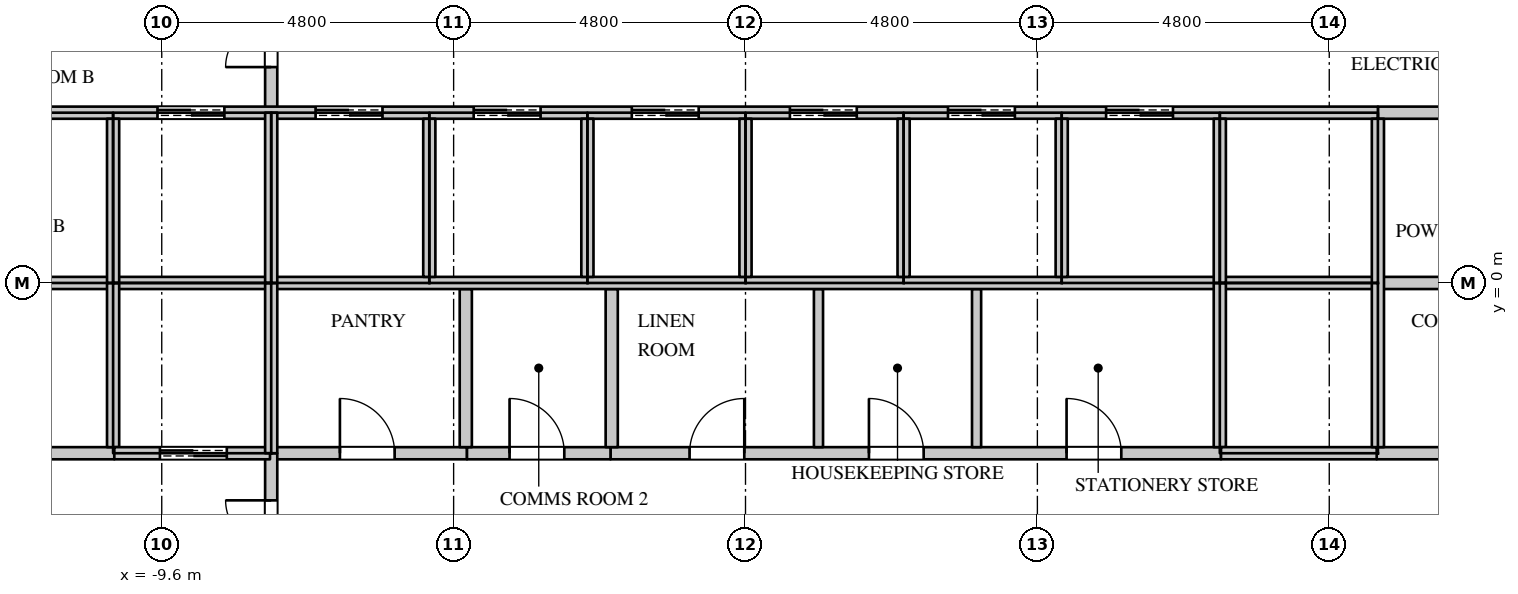
"""IFC4 building model, lengths in metres.
Left out: names, types, materials, properties, quantities, classifications, styles, units other than length and angle.
Written with IfcOpenShell. Run it as: python <this file> out.ifc"""

import sys

from ifc_helpers import new_model, si_unit, direction, frame, frame_2d, origin, place, context, subcontext, project, spatial, rectangle, extrude, element, fill, save


model = new_model("IFC4")
c1 = context("Model", 3, precision=1e-05, world=origin(), true_north=direction((0.0, 1.0)))
c2 = subcontext(c1, "Body", "Model", "MODEL_VIEW")
j1 = project(units=[si_unit("LENGTHUNIT", "METRE"), si_unit("PLANEANGLEUNIT", "RADIAN")], contexts=[c1])
p1 = place(None, origin())
s1 = spatial("IfcSite", under=j1, at=p1, CompositionType="ELEMENT")
p2 = place(p1, origin())
s2 = spatial("IfcBuilding", under=s1, at=p2, CompositionType="ELEMENT")
p3 = place(p2, frame((0.0, 0.0, 106.5)))
s3 = spatial("IfcBuildingStorey", under=s2, at=p3, CompositionType="ELEMENT", Elevation=106.5)
p4 = place(p3, frame((-7.82, -2.8, 0.0), z_axis=(0.0, 0.0, 1.0), x_axis=(1.0, 0.0, 0.0)))
e1 = element("IfcWall", 1, at=p4, inside=s3, PredefinedType="PARTITIONING", context=c2, shape_type="SweptSolid", body=[
    extrude(rectangle(XDim=3.24, YDim=0.2, at=frame_2d((1.62, 0.0))), origin(), (0.0, 0.0, 1.0), 3.95),
])
p5 = place(p4, frame((1.15, 0.0, 0.0)))
e2 = element("IfcOpeningElement", 2, at=p5, cuts=e1, PredefinedType="OPENING", context=c2, shape_type="SweptSolid", body=[
    extrude(rectangle(XDim=0.9, YDim=2.2, at=frame_2d((0.45, 1.1))), frame((0.0, 0.11, 0.0), z_axis=(0.0, -1.0, 0.0), x_axis=(1.0, 0.0, 0.0)), (0.0, 0.0, 1.0), 0.22),
])
p6 = place(p3, frame((-7.8, -8.075, 0.0), z_axis=(0.0, 0.0, 1.0), x_axis=(0.0, 1.0, 0.0)))
e3 = element("IfcWall", 3, at=p6, inside=s3, PredefinedType="PARTITIONING", context=c2, shape_type="SweptSolid", body=[
    extrude(rectangle(XDim=5.275, YDim=0.2, at=frame_2d((2.637, 0.0))), origin(), (0.0, 0.0, 1.0), 3.95),
])
p7 = place(p6, frame((3.0, 0.0, 0.0)))
e4 = element("IfcOpeningElement", 4, at=p7, cuts=e3, PredefinedType="OPENING", context=c2, shape_type="SweptSolid", body=[
    extrude(rectangle(XDim=1.5, YDim=2.4, at=frame_2d((0.75, 1.2))), frame((0.0, 0.11, 0.0), z_axis=(0.0, -1.0, 0.0), x_axis=(1.0, 0.0, 0.0)), (0.0, 0.0, 1.0), 0.22),
])
p8 = place(p3, frame((-7.8, 2.8, 0.0), z_axis=(0.0, 0.0, 1.0), x_axis=(0.0, 1.0, 0.0)))
e5 = element("IfcWall", 5, at=p8, inside=s3, PredefinedType="PARTITIONING", context=c2, shape_type="SweptSolid", body=[
    extrude(rectangle(XDim=5.275, YDim=0.2, at=frame_2d((2.637, 0.0))), origin(), (0.0, 0.0, 1.0), 3.95),
])
p9 = place(p8, frame((0.75, 0.0, 0.0)))
e6 = element("IfcOpeningElement", 6, at=p9, cuts=e5, PredefinedType="OPENING", context=c2, shape_type="SweptSolid", body=[
    extrude(rectangle(XDim=1.5, YDim=2.4, at=frame_2d((0.75, 1.2))), frame((0.0, 0.11, 0.0), z_axis=(0.0, -1.0, 0.0), x_axis=(1.0, 0.0, 0.0)), (0.0, 0.0, 1.0), 0.22),
])
p10 = place(p3, frame((-2.22, -2.8, 0.0), z_axis=(0.0, 0.0, 1.0), x_axis=(1.0, 0.0, 0.0)))
e7 = element("IfcWall", 7, at=p10, inside=s3, PredefinedType="PARTITIONING", context=c2, shape_type="SweptSolid", body=[
    extrude(rectangle(XDim=10.04, YDim=0.2, at=frame_2d((5.02, 0.0))), origin(), (0.0, 0.0, 1.0), 3.95),
])
p11 = place(p10, frame((1.3, 0.0, 0.0)))
e8 = element("IfcOpeningElement", 8, at=p11, cuts=e7, PredefinedType="OPENING", context=c2, shape_type="SweptSolid", body=[
    extrude(rectangle(XDim=0.9, YDim=2.2, at=frame_2d((0.45, 1.1))), frame((0.0, 0.11, 0.0), z_axis=(0.0, -1.0, 0.0), x_axis=(1.0, 0.0, 0.0)), (0.0, 0.0, 1.0), 0.22),
])
p12 = place(p10, frame((4.25, 0.0, 0.0)))
e9 = element("IfcOpeningElement", 9, at=p12, cuts=e7, PredefinedType="OPENING", context=c2, shape_type="SweptSolid", body=[
    extrude(rectangle(XDim=0.9, YDim=2.2, at=frame_2d((0.45, 1.1))), frame((0.0, 0.11, 0.0), z_axis=(0.0, -1.0, 0.0), x_axis=(1.0, 0.0, 0.0)), (0.0, 0.0, 1.0), 0.22),
])
p13 = place(p10, frame((7.5, 0.0, 0.0)))
e10 = element("IfcOpeningElement", 10, at=p13, cuts=e7, PredefinedType="OPENING", context=c2, shape_type="SweptSolid", body=[
    extrude(rectangle(XDim=0.9, YDim=2.2, at=frame_2d((0.45, 1.1))), frame((0.0, 0.11, 0.0), z_axis=(0.0, -1.0, 0.0), x_axis=(1.0, 0.0, 0.0)), (0.0, 0.0, 1.0), 0.22),
])
for number, where, z_axis, x_axis in (
    (11, (1.2, -2.7, 0.0), (0.0, 0.0, 1.0), (0.0, 1.0, 0.0)),
    (12, (3.8, -2.7, 0.0), (0.0, 0.0, 1.0), (0.0, 1.0, 0.0)),
):
    element("IfcWall", number, at=place(p3, frame(where, z_axis=z_axis, x_axis=x_axis)), inside=s3, PredefinedType="PARTITIONING", context=c2, shape_type="SweptSolid", body=[
        extrude(rectangle(XDim=2.6, YDim=0.15, at=frame_2d((1.3, 0.0))), origin(), (0.0, 0.0, 1.0), 3.95),
    ])
p14 = place(p3, frame((-13.57, -2.8, 0.0), z_axis=(0.0, 0.0, 1.0), x_axis=(1.0, 0.0, 0.0)))
e13 = element("IfcWall", 13, at=p14, inside=s3, PredefinedType="PARTITIONING", context=c2, shape_type="SweptSolid", body=[
    extrude(rectangle(XDim=3.19, YDim=0.2, at=frame_2d((1.595, 0.0))), origin(), (0.0, 0.0, 1.0), 3.95),
])
p15 = place(p14, frame((1.25, 0.0, 0.0)))
e14 = element("IfcOpeningElement", 14, at=p15, cuts=e13, PredefinedType="OPENING", context=c2, shape_type="SweptSolid", body=[
    extrude(rectangle(XDim=0.6, YDim=2.0, at=frame_2d((0.3, 1.0))), frame((0.0, 0.11, 0.0), z_axis=(0.0, -1.0, 0.0), x_axis=(1.0, 0.0, 0.0)), (0.0, 0.0, 1.0), 0.22),
])
p16 = place(p3, frame((-4.58, -2.8, 0.0), z_axis=(0.0, 0.0, 1.0), x_axis=(1.0, 0.0, 0.0)))
e15 = element("IfcWall", 15, at=p16, inside=s3, PredefinedType="PARTITIONING", context=c2, shape_type="SweptSolid", body=[
    extrude(rectangle(XDim=2.36, YDim=0.2, at=frame_2d((1.18, 0.0))), origin(), (0.0, 0.0, 1.0), 3.95),
])
p17 = place(p16, frame((0.7, 0.0, 0.0)))
e16 = element("IfcOpeningElement", 16, at=p17, cuts=e15, PredefinedType="OPENING", context=c2, shape_type="SweptSolid", body=[
    extrude(rectangle(XDim=0.9, YDim=2.2, at=frame_2d((0.45, 1.1))), frame((0.0, 0.11, 0.0), z_axis=(0.0, -1.0, 0.0), x_axis=(1.0, 0.0, 0.0)), (0.0, 0.0, 1.0), 0.22),
])
for number, where, z_axis, x_axis in (
    (17, (-4.6, -2.7, 0.0), (0.0, 0.0, 1.0), (0.0, 1.0, 0.0)),
    (18, (-2.2, -2.7, 0.0), (0.0, 0.0, 1.0), (0.0, 1.0, 0.0)),
):
    element("IfcWall", number, at=place(p3, frame(where, z_axis=z_axis, x_axis=x_axis)), inside=s3, PredefinedType="PARTITIONING", context=c2, shape_type="SweptSolid", body=[
        extrude(rectangle(XDim=2.6, YDim=0.2, at=frame_2d((1.3, 0.0))), origin(), (0.0, 0.0, 1.0), 3.95),
    ])
p18 = place(p3, frame((10.38, -2.8, 0.0), z_axis=(0.0, 0.0, 1.0), x_axis=(1.0, 0.0, 0.0)))
e19 = element("IfcWall", 19, at=p18, inside=s3, PredefinedType="PARTITIONING", context=c2, shape_type="SweptSolid", body=[
    extrude(rectangle(XDim=3.19, YDim=0.2, at=frame_2d((1.595, 0.0))), origin(), (0.0, 0.0, 1.0), 3.95),
])
p19 = place(p18, frame((1.1, 0.0, 0.0)))
e20 = element("IfcOpeningElement", 20, at=p19, cuts=e19, PredefinedType="OPENING", context=c2, shape_type="SweptSolid", body=[
    extrude(rectangle(XDim=0.9, YDim=2.2, at=frame_2d((0.45, 1.1))), frame((0.0, 0.11, 0.0), z_axis=(0.0, -1.0, 0.0), x_axis=(1.0, 0.0, 0.0)), (0.0, 0.0, 1.0), 0.22),
])
p20 = place(p3, frame((10.4, 2.8, 0.0), z_axis=(0.0, 0.0, 1.0), x_axis=(1.0, 0.0, 0.0)))
e21 = element("IfcWall", 21, at=p20, inside=s3, PredefinedType="PARTITIONING", context=c2, shape_type="SweptSolid", body=[
    extrude(rectangle(XDim=3.17, YDim=0.2, at=frame_2d((1.585, 0.0))), origin(), (0.0, 0.0, 1.0), 3.95),
])
p21 = place(p20, frame((1.25, 0.0, 0.0)))
e22 = element("IfcOpeningElement", 22, at=p21, cuts=e21, PredefinedType="OPENING", context=c2, shape_type="SweptSolid", body=[
    extrude(rectangle(XDim=0.6, YDim=2.0, at=frame_2d((0.3, 1.0))), frame((0.0, 0.11, 0.0), z_axis=(0.0, -1.0, 0.0), x_axis=(1.0, 0.0, 0.0)), (0.0, 0.0, 1.0), 0.22),
])
p22 = place(p3, frame((10.4, 0.0, 0.0), z_axis=(0.0, 0.0, 1.0), x_axis=(1.0, 0.0, 0.0)))
e23 = element("IfcWall", 23, at=p22, inside=s3, PredefinedType="PARTITIONING", context=c2, shape_type="SweptSolid", body=[
    extrude(rectangle(XDim=3.17, YDim=0.2, at=frame_2d((1.585, 0.0))), origin(), (0.0, 0.0, 1.0), 3.95),
])
p23 = place(p3, frame((-13.57, 0.0, 0.0), z_axis=(0.0, 0.0, 1.0), x_axis=(1.0, 0.0, 0.0)))
e24 = element("IfcWall", 24, at=p23, inside=s3, PredefinedType="PARTITIONING", context=c2, shape_type="SweptSolid", body=[
    extrude(rectangle(XDim=23.97, YDim=0.2, at=frame_2d((11.985, 0.0))), origin(), (0.0, 0.0, 1.0), 3.95),
])
p24 = place(p3, frame((-13.57, 2.8, 0.0), z_axis=(0.0, 0.0, 1.0), x_axis=(1.0, 0.0, 0.0)))
e25 = element("IfcWall", 25, at=p24, inside=s3, PredefinedType="PARTITIONING", context=c2, shape_type="SweptSolid", body=[
    extrude(rectangle(XDim=23.97, YDim=0.2, at=frame_2d((11.985, 0.0))), origin(), (0.0, 0.0, 1.0), 3.95),
])
p25 = place(p24, frame((1.0, 0.0, 0.0)))
e26 = element("IfcOpeningElement", 26, at=p25, cuts=e25, PredefinedType="OPENING", context=c2, shape_type="SweptSolid", body=[
    extrude(rectangle(XDim=1.1, YDim=2.2, at=frame_2d((0.55, 1.1))), frame((0.0, 0.11, 0.0), z_axis=(0.0, -1.0, 0.0), x_axis=(1.0, 0.0, 0.0)), (0.0, 0.0, 1.0), 0.22),
])
p26 = place(p24, frame((3.9, 0.0, 0.0)))
e27 = element("IfcOpeningElement", 27, at=p26, cuts=e25, PredefinedType="OPENING", context=c2, shape_type="SweptSolid", body=[
    extrude(rectangle(XDim=1.1, YDim=2.2, at=frame_2d((0.55, 1.1))), frame((0.0, 0.11, 0.0), z_axis=(0.0, -1.0, 0.0), x_axis=(1.0, 0.0, 0.0)), (0.0, 0.0, 1.0), 0.22),
])
p27 = place(p24, frame((6.5, 0.0, 0.0)))
e28 = element("IfcOpeningElement", 28, at=p27, cuts=e25, PredefinedType="OPENING", context=c2, shape_type="SweptSolid", body=[
    extrude(rectangle(XDim=1.1, YDim=2.2, at=frame_2d((0.55, 1.1))), frame((0.0, 0.11, 0.0), z_axis=(0.0, -1.0, 0.0), x_axis=(1.0, 0.0, 0.0)), (0.0, 0.0, 1.0), 0.22),
])
p28 = place(p24, frame((9.1, 0.0, 0.0)))
e29 = element("IfcOpeningElement", 29, at=p28, cuts=e25, PredefinedType="OPENING", context=c2, shape_type="SweptSolid", body=[
    extrude(rectangle(XDim=1.1, YDim=2.2, at=frame_2d((0.55, 1.1))), frame((0.0, 0.11, 0.0), z_axis=(0.0, -1.0, 0.0), x_axis=(1.0, 0.0, 0.0)), (0.0, 0.0, 1.0), 0.22),
])
p29 = place(p24, frame((11.7, 0.0, 0.0)))
e30 = element("IfcOpeningElement", 30, at=p29, cuts=e25, PredefinedType="OPENING", context=c2, shape_type="SweptSolid", body=[
    extrude(rectangle(XDim=1.1, YDim=2.2, at=frame_2d((0.55, 1.1))), frame((0.0, 0.11, 0.0), z_axis=(0.0, -1.0, 0.0), x_axis=(1.0, 0.0, 0.0)), (0.0, 0.0, 1.0), 0.22),
])
p30 = place(p24, frame((14.3, 0.0, 0.0)))
e31 = element("IfcOpeningElement", 31, at=p30, cuts=e25, PredefinedType="OPENING", context=c2, shape_type="SweptSolid", body=[
    extrude(rectangle(XDim=1.1, YDim=2.2, at=frame_2d((0.55, 1.1))), frame((0.0, 0.11, 0.0), z_axis=(0.0, -1.0, 0.0), x_axis=(1.0, 0.0, 0.0)), (0.0, 0.0, 1.0), 0.22),
])
p31 = place(p24, frame((16.9, 0.0, 0.0)))
e32 = element("IfcOpeningElement", 32, at=p31, cuts=e25, PredefinedType="OPENING", context=c2, shape_type="SweptSolid", body=[
    extrude(rectangle(XDim=1.1, YDim=2.2, at=frame_2d((0.55, 1.1))), frame((0.0, 0.11, 0.0), z_axis=(0.0, -1.0, 0.0), x_axis=(1.0, 0.0, 0.0)), (0.0, 0.0, 1.0), 0.22),
])
p32 = place(p24, frame((19.5, 0.0, 0.0)))
e33 = element("IfcOpeningElement", 33, at=p32, cuts=e25, PredefinedType="OPENING", context=c2, shape_type="SweptSolid", body=[
    extrude(rectangle(XDim=1.1, YDim=2.2, at=frame_2d((0.55, 1.1))), frame((0.0, 0.11, 0.0), z_axis=(0.0, -1.0, 0.0), x_axis=(1.0, 0.0, 0.0)), (0.0, 0.0, 1.0), 0.22),
])
p33 = place(p3, frame((-10.4, -2.7, 0.0), z_axis=(0.0, 0.0, 1.0), x_axis=(0.0, 1.0, 0.0)))
e34 = element("IfcWall", 34, at=p33, inside=s3, PredefinedType="PARTITIONING", context=c2, shape_type="SweptSolid", body=[
    extrude(rectangle(XDim=2.7, YDim=0.2, at=frame_2d((1.35, 0.0))), origin(), (0.0, 0.0, 1.0), 3.95),
])
p34 = place(p3, frame((-10.38, -2.8, 0.0), z_axis=(0.0, 0.0, 1.0), x_axis=(1.0, 0.0, 0.0)))
e35 = element("IfcWall", 35, at=p34, inside=s3, PredefinedType="PARTITIONING", context=c2, shape_type="SweptSolid", body=[
    extrude(rectangle(XDim=2.56, YDim=0.2, at=frame_2d((1.28, 0.0))), origin(), (0.0, 0.0, 1.0), 3.95),
])
p35 = place(p34, frame((0.75, 0.0, 0.0)))
e36 = element("IfcOpeningElement", 36, at=p35, cuts=e35, PredefinedType="OPENING", context=c2, shape_type="SweptSolid", body=[
    extrude(rectangle(XDim=1.1, YDim=2.2, at=frame_2d((0.55, 1.1))), frame((0.0, 0.11, 0.0), z_axis=(0.0, -1.0, 0.0), x_axis=(1.0, 0.0, 0.0)), (0.0, 0.0, 1.0), 0.22),
])
p36 = place(p3, frame((-10.4, 0.0, 0.0), z_axis=(0.0, 0.0, 1.0), x_axis=(0.0, 1.0, 0.0)))
e37 = element("IfcWall", 37, at=p36, inside=s3, PredefinedType="PARTITIONING", context=c2, shape_type="SweptSolid", body=[
    extrude(rectangle(XDim=2.7, YDim=0.2, at=frame_2d((1.35, 0.0))), origin(), (0.0, 0.0, 1.0), 3.95),
])
for number, where, z_axis, x_axis in (
    (38, (-7.8, -2.8, 0.0), (0.0, 0.0, 1.0), (0.0, 1.0, 0.0)),
    (39, (-7.8, 0.0, 0.0), (0.0, 0.0, 1.0), (0.0, 1.0, 0.0)),
):
    element("IfcWall", number, at=place(p3, frame(where, z_axis=z_axis, x_axis=x_axis)), inside=s3, PredefinedType="PARTITIONING", context=c2, shape_type="SweptSolid", body=[
        extrude(rectangle(XDim=2.8, YDim=0.2, at=frame_2d((1.4, 0.0))), origin(), (0.0, 0.0, 1.0), 3.95),
    ])
for number, where, z_axis, x_axis in (
    (40, (-5.2, 0.1, 0.0), (0.0, 0.0, 1.0), (0.0, 1.0, 0.0)),
    (41, (-2.6, 0.1, 0.0), (0.0, 0.0, 1.0), (0.0, 1.0, 0.0)),
    (42, (0.0, 0.1, 0.0), (0.0, 0.0, 1.0), (0.0, 1.0, 0.0)),
    (43, (2.6, 0.1, 0.0), (0.0, 0.0, 1.0), (0.0, 1.0, 0.0)),
    (44, (5.2, 0.1, 0.0), (0.0, 0.0, 1.0), (0.0, 1.0, 0.0)),
):
    element("IfcWall", number, at=place(p3, frame(where, z_axis=z_axis, x_axis=x_axis)), inside=s3, PredefinedType="PARTITIONING", context=c2, shape_type="SweptSolid", body=[
        extrude(rectangle(XDim=2.6, YDim=0.2, at=frame_2d((1.3, 0.0))), origin(), (0.0, 0.0, 1.0), 3.95),
    ])
p37 = place(p3, frame((7.8, -2.7, 0.0), z_axis=(0.0, 0.0, 1.0), x_axis=(0.0, 1.0, 0.0)))
e45 = element("IfcWall", 45, at=p37, inside=s3, PredefinedType="PARTITIONING", context=c2, shape_type="SweptSolid", body=[
    extrude(rectangle(XDim=2.7, YDim=0.2, at=frame_2d((1.35, 0.0))), origin(), (0.0, 0.0, 1.0), 3.95),
])
p38 = place(p3, frame((7.82, -2.8, 0.0), z_axis=(0.0, 0.0, 1.0), x_axis=(1.0, 0.0, 0.0)))
e46 = element("IfcWall", 46, at=p38, inside=s3, PredefinedType="PARTITIONING", context=c2, shape_type="SweptSolid", body=[
    extrude(rectangle(XDim=2.56, YDim=0.2, at=frame_2d((1.28, 0.0))), origin(), (0.0, 0.0, 1.0), 3.95),
])
p39 = place(p3, frame((7.8, 0.0, 0.0), z_axis=(0.0, 0.0, 1.0), x_axis=(0.0, 1.0, 0.0)))
e47 = element("IfcWall", 47, at=p39, inside=s3, PredefinedType="PARTITIONING", context=c2, shape_type="SweptSolid", body=[
    extrude(rectangle(XDim=2.7, YDim=0.2, at=frame_2d((1.35, 0.0))), origin(), (0.0, 0.0, 1.0), 3.95),
])
p40 = place(p3, frame((10.4, -2.7, 0.0), z_axis=(0.0, 0.0, 1.0), x_axis=(0.0, 1.0, 0.0)))
e48 = element("IfcWall", 48, at=p40, inside=s3, PredefinedType="PARTITIONING", context=c2, shape_type="SweptSolid", body=[
    extrude(rectangle(XDim=5.4, YDim=0.2, at=frame_2d((2.7, 0.0))), origin(), (0.0, 0.0, 1.0), 3.95),
])
p41 = place(p5, origin())
e49 = element("IfcDoor", 49, at=p41, inside=s3, OperationType="SINGLE_SWING_LEFT", PredefinedType="DOOR", context=c2, shape_type="SweptSolid", body=[
    extrude(rectangle(XDim=0.9, YDim=2.2, at=frame_2d((0.45, 1.1))), frame((0.0, 0.025, 0.0), z_axis=(0.0, -1.0, 0.0), x_axis=(1.0, 0.0, 0.0)), (0.0, 0.0, 1.0), 0.05),
])
fill(e2, e49)
p42 = place(p17, origin())
e50 = element("IfcDoor", 50, at=p42, inside=s3, OperationType="SINGLE_SWING_LEFT", PredefinedType="DOOR", context=c2, shape_type="SweptSolid", body=[
    extrude(rectangle(XDim=0.9, YDim=2.2, at=frame_2d((0.45, 1.1))), frame((0.0, 0.025, 0.0), z_axis=(0.0, -1.0, 0.0), x_axis=(1.0, 0.0, 0.0)), (0.0, 0.0, 1.0), 0.05),
])
fill(e16, e50)
p43 = place(p11, origin())
e51 = element("IfcDoor", 51, at=p43, inside=s3, OperationType="SINGLE_SWING_RIGHT", PredefinedType="DOOR", context=c2, shape_type="SweptSolid", body=[
    extrude(rectangle(XDim=0.9, YDim=2.2, at=frame_2d((0.45, 1.1))), frame((0.0, 0.025, 0.0), z_axis=(0.0, -1.0, 0.0), x_axis=(1.0, 0.0, 0.0)), (0.0, 0.0, 1.0), 0.05),
])
fill(e8, e51)
p44 = place(p12, origin())
e52 = element("IfcDoor", 52, at=p44, inside=s3, OperationType="SINGLE_SWING_LEFT", PredefinedType="DOOR", context=c2, shape_type="SweptSolid", body=[
    extrude(rectangle(XDim=0.9, YDim=2.2, at=frame_2d((0.45, 1.1))), frame((0.0, 0.025, 0.0), z_axis=(0.0, -1.0, 0.0), x_axis=(1.0, 0.0, 0.0)), (0.0, 0.0, 1.0), 0.05),
])
fill(e9, e52)
p45 = place(p13, origin())
e53 = element("IfcDoor", 53, at=p45, inside=s3, OperationType="SINGLE_SWING_LEFT", PredefinedType="DOOR", context=c2, shape_type="SweptSolid", body=[
    extrude(rectangle(XDim=0.9, YDim=2.2, at=frame_2d((0.45, 1.1))), frame((0.0, 0.025, 0.0), z_axis=(0.0, -1.0, 0.0), x_axis=(1.0, 0.0, 0.0)), (0.0, 0.0, 1.0), 0.05),
])
fill(e10, e53)
p46 = place(p26, origin())
e54 = element("IfcDoor", 54, at=p46, inside=s3, OperationType="DOUBLE_DOOR_SLIDING", PredefinedType="DOOR", context=c2, shape_type="SweptSolid", body=[
    extrude(rectangle(XDim=1.1, YDim=2.2, at=frame_2d((0.55, 1.1))), frame((0.0, 0.025, 0.0), z_axis=(0.0, -1.0, 0.0), x_axis=(1.0, 0.0, 0.0)), (0.0, 0.0, 1.0), 0.05),
])
fill(e27, e54)
p47 = place(p35, origin())
e55 = element("IfcDoor", 55, at=p47, inside=s3, OperationType="DOUBLE_DOOR_SLIDING", PredefinedType="DOOR", context=c2, shape_type="SweptSolid", body=[
    extrude(rectangle(XDim=1.1, YDim=2.2, at=frame_2d((0.55, 1.1))), frame((0.0, 0.025, 0.0), z_axis=(0.0, -1.0, 0.0), x_axis=(1.0, 0.0, 0.0)), (0.0, 0.0, 1.0), 0.05),
])
fill(e36, e55)
p48 = place(p27, origin())
e56 = element("IfcDoor", 56, at=p48, inside=s3, OperationType="DOUBLE_DOOR_SLIDING", PredefinedType="DOOR", context=c2, shape_type="SweptSolid", body=[
    extrude(rectangle(XDim=1.1, YDim=2.2, at=frame_2d((0.55, 1.1))), frame((0.0, 0.025, 0.0), z_axis=(0.0, -1.0, 0.0), x_axis=(1.0, 0.0, 0.0)), (0.0, 0.0, 1.0), 0.05),
])
fill(e28, e56)
p49 = place(p28, origin())
e57 = element("IfcDoor", 57, at=p49, inside=s3, OperationType="DOUBLE_DOOR_SLIDING", PredefinedType="DOOR", context=c2, shape_type="SweptSolid", body=[
    extrude(rectangle(XDim=1.1, YDim=2.2, at=frame_2d((0.55, 1.1))), frame((0.0, 0.025, 0.0), z_axis=(0.0, -1.0, 0.0), x_axis=(1.0, 0.0, 0.0)), (0.0, 0.0, 1.0), 0.05),
])
fill(e29, e57)
p50 = place(p29, origin())
e58 = element("IfcDoor", 58, at=p50, inside=s3, OperationType="DOUBLE_DOOR_SLIDING", PredefinedType="DOOR", context=c2, shape_type="SweptSolid", body=[
    extrude(rectangle(XDim=1.1, YDim=2.2, at=frame_2d((0.55, 1.1))), frame((0.0, 0.025, 0.0), z_axis=(0.0, -1.0, 0.0), x_axis=(1.0, 0.0, 0.0)), (0.0, 0.0, 1.0), 0.05),
])
fill(e30, e58)
p51 = place(p30, origin())
e59 = element("IfcDoor", 59, at=p51, inside=s3, OperationType="DOUBLE_DOOR_SLIDING", PredefinedType="DOOR", context=c2, shape_type="SweptSolid", body=[
    extrude(rectangle(XDim=1.1, YDim=2.2, at=frame_2d((0.55, 1.1))), frame((0.0, 0.025, 0.0), z_axis=(0.0, -1.0, 0.0), x_axis=(1.0, 0.0, 0.0)), (0.0, 0.0, 1.0), 0.05),
])
fill(e31, e59)
p52 = place(p31, origin())
e60 = element("IfcDoor", 60, at=p52, inside=s3, OperationType="DOUBLE_DOOR_SLIDING", PredefinedType="DOOR", context=c2, shape_type="SweptSolid", body=[
    extrude(rectangle(XDim=1.1, YDim=2.2, at=frame_2d((0.55, 1.1))), frame((0.0, 0.025, 0.0), z_axis=(0.0, -1.0, 0.0), x_axis=(1.0, 0.0, 0.0)), (0.0, 0.0, 1.0), 0.05),
])
fill(e32, e60)
p53 = place(p32, origin())
e61 = element("IfcDoor", 61, at=p53, inside=s3, OperationType="DOUBLE_DOOR_SLIDING", PredefinedType="DOOR", context=c2, shape_type="SweptSolid", body=[
    extrude(rectangle(XDim=1.1, YDim=2.2, at=frame_2d((0.55, 1.1))), frame((0.0, 0.025, 0.0), z_axis=(0.0, -1.0, 0.0), x_axis=(1.0, 0.0, 0.0)), (0.0, 0.0, 1.0), 0.05),
])
fill(e33, e61)
p54 = place(p9, origin())
e62 = element("IfcDoor", 62, at=p54, inside=s3, OperationType="DOUBLE_DOOR_SINGLE_SWING", PredefinedType="DOOR", context=c2, shape_type="SweptSolid", body=[
    extrude(rectangle(XDim=1.5, YDim=2.4, at=frame_2d((0.75, 1.2))), frame((0.0, 0.025, 0.0), z_axis=(0.0, -1.0, 0.0), x_axis=(1.0, 0.0, 0.0)), (0.0, 0.0, 1.0), 0.05),
])
fill(e6, e62)
p55 = place(p7, origin())
e63 = element("IfcDoor", 63, at=p55, inside=s3, OperationType="DOUBLE_DOOR_SINGLE_SWING", PredefinedType="DOOR", context=c2, shape_type="SweptSolid", body=[
    extrude(rectangle(XDim=1.5, YDim=2.4, at=frame_2d((0.75, 1.2))), frame((0.0, 0.025, 0.0), z_axis=(0.0, -1.0, 0.0), x_axis=(1.0, 0.0, 0.0)), (0.0, 0.0, 1.0), 0.05),
])
fill(e4, e63)
save(model, sys.argv[1])
